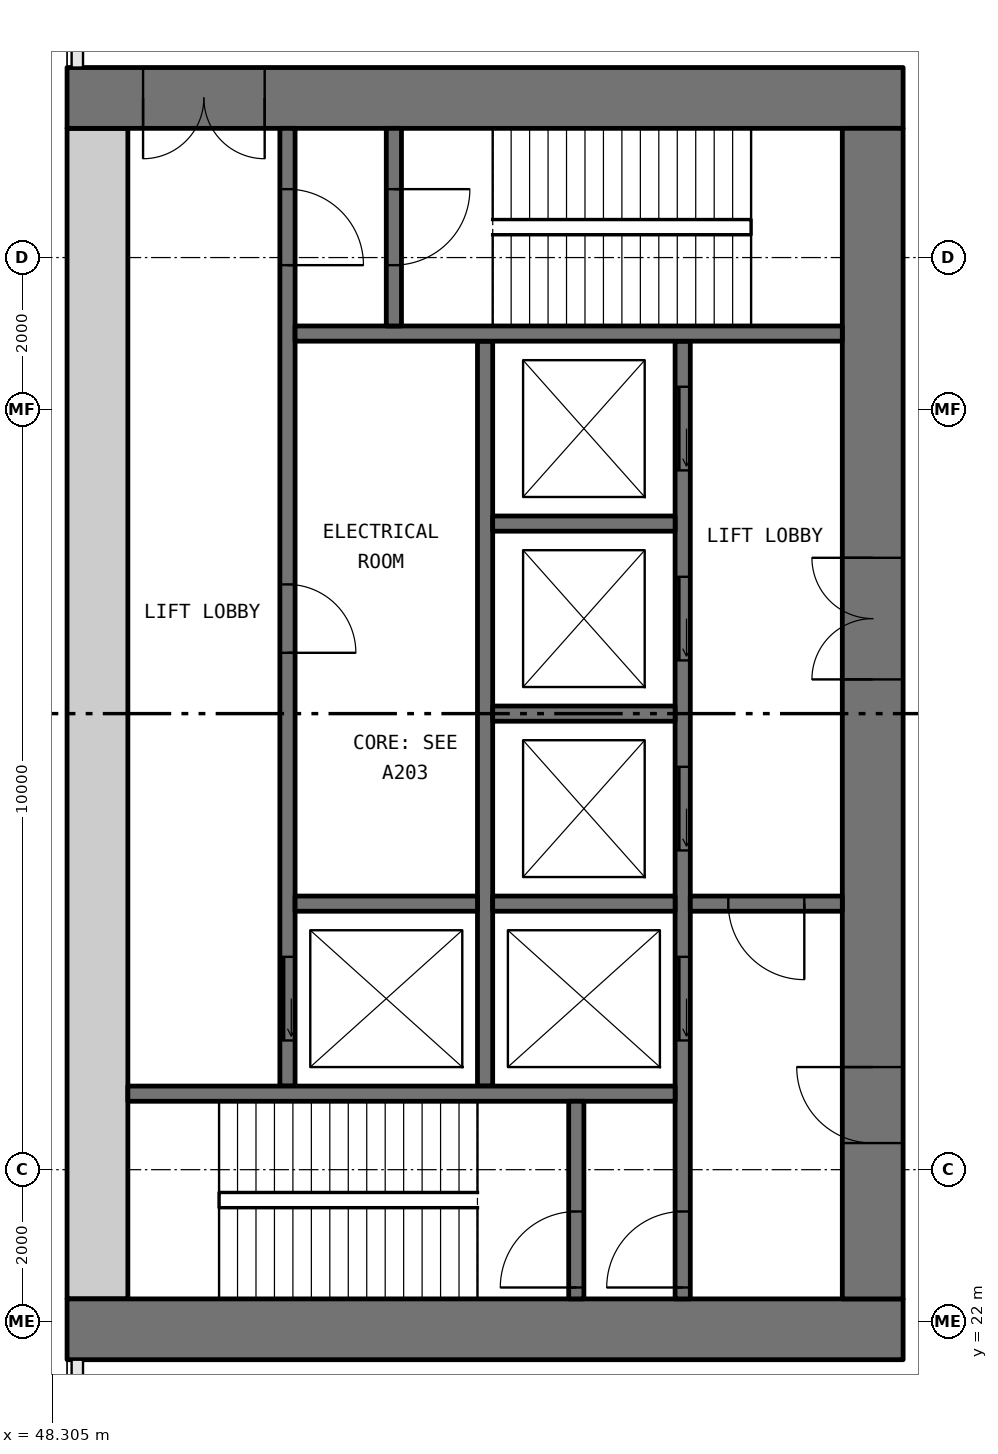
"""IFC4 building model, lengths in metres.
Left out: names, types, materials, properties, quantities, classifications, styles, units other than length and angle.
Written with IfcOpenShell. Run it as: python <this file> out.ifc"""

import sys

from ifc_helpers import new_model, si_unit, direction, frame, frame_2d, origin, place, context, subcontext, project, spatial, rectangle, extrude, element, fill, save


model = new_model("IFC4")
c1 = context("Model", 3, precision=1e-05, world=origin(), true_north=direction((0.0, 1.0)))
c2 = subcontext(c1, "Body", "Model", "MODEL_VIEW")
j1 = project(units=[si_unit("LENGTHUNIT", "METRE"), si_unit("PLANEANGLEUNIT", "RADIAN")], contexts=[c1])
p1 = place(None, origin())
s1 = spatial("IfcSite", under=j1, at=p1, CompositionType="ELEMENT")
p2 = place(p1, origin())
s2 = spatial("IfcBuilding", under=s1, at=p2, CompositionType="ELEMENT")
p3 = place(p2, frame((0.0, 0.0, 12.0)))
s3 = spatial("IfcBuildingStorey", under=s2, at=p3, CompositionType="ELEMENT", Elevation=12.0)
p4 = place(p3, frame((59.5, 21.9, 0.0), z_axis=(0.0, 0.0, 1.0), x_axis=(-1.0, 0.0, 0.0)))
e1 = element("IfcWall", 1, at=p4, inside=s3, PredefinedType="SHEAR", context=c2, shape_type="SweptSolid", body=[
    extrude(rectangle(XDim=11.0, YDim=0.8, at=frame_2d((5.5, 0.0))), origin(), (0.0, 0.0, 1.0), 5.6),
])
p5 = place(p3, frame((59.5, 38.1, 0.0), z_axis=(0.0, 0.0, 1.0), x_axis=(-1.0, 0.0, 0.0)))
e2 = element("IfcWall", 2, at=p5, inside=s3, PredefinedType="SHEAR", context=c2, shape_type="SweptSolid", body=[
    extrude(rectangle(XDim=11.0, YDim=0.8, at=frame_2d((5.5, 0.0))), origin(), (0.0, 0.0, 1.0), 5.6),
])
p6 = place(p5, frame((8.4, 0.0, 0.0)))
e3 = element("IfcOpeningElement", 3, at=p6, cuts=e2, PredefinedType="OPENING", context=c2, shape_type="SweptSolid", body=[
    extrude(rectangle(XDim=1.6, YDim=2.1, at=frame_2d((0.8, 1.05))), frame((0.0, 0.41, 0.0), z_axis=(0.0, -1.0, 0.0), x_axis=(1.0, 0.0, 0.0)), (0.0, 0.0, 1.0), 0.82),
])
p7 = place(p3, frame((59.1, 22.3, 0.0), z_axis=(0.0, 0.0, 1.0), x_axis=(0.0, 1.0, 0.0)))
e4 = element("IfcWall", 4, at=p7, inside=s3, PredefinedType="SHEAR", context=c2, shape_type="SweptSolid", body=[
    extrude(rectangle(XDim=15.4, YDim=0.8, at=frame_2d((7.7, 0.0))), origin(), (0.0, 0.0, 1.0), 5.6),
])
p8 = place(p7, frame((8.15, 0.0, 0.0)))
e5 = element("IfcOpeningElement", 5, at=p8, cuts=e4, PredefinedType="OPENING", context=c2, shape_type="SweptSolid", body=[
    extrude(rectangle(XDim=1.6, YDim=2.1, at=frame_2d((0.8, 1.05))), frame((0.0, 0.41, 0.0), z_axis=(0.0, -1.0, 0.0), x_axis=(1.0, 0.0, 0.0)), (0.0, 0.0, 1.0), 0.82),
])
p9 = place(p7, frame((2.05, 0.0, 0.0)))
e6 = element("IfcOpeningElement", 6, at=p9, cuts=e4, PredefinedType="OPENING", context=c2, shape_type="SweptSolid", body=[
    extrude(rectangle(XDim=1.0, YDim=2.1, at=frame_2d((0.5, 1.05))), frame((0.0, 0.41, 0.0), z_axis=(0.0, -1.0, 0.0), x_axis=(1.0, 0.0, 0.0)), (0.0, 0.0, 1.0), 0.82),
])
p10 = place(p3, frame((48.9, 22.3, 0.0), z_axis=(0.0, 0.0, 1.0), x_axis=(0.0, 1.0, 0.0)))
e7 = element("IfcWall", 7, at=p10, inside=s3, PredefinedType="SHEAR", context=c2, shape_type="SweptSolid", body=[
    extrude(rectangle(XDim=15.4, YDim=0.8, at=frame_2d((7.7, 0.0))), origin(), (0.0, 0.0, 1.0), 5.6),
])
p11 = place(p3, frame((56.6, 22.3, 0.0), z_axis=(0.0, 0.0, 1.0), x_axis=(0.0, 1.0, 0.0)))
e8 = element("IfcWall", 8, at=p11, inside=s3, PredefinedType="SOLIDWALL", context=c2, shape_type="SweptSolid", body=[
    extrude(rectangle(XDim=12.6, YDim=0.2, at=frame_2d((6.3, 0.0))), origin(), (0.0, 0.0, 1.0), 5.6),
])
p12 = place(p11, frame((3.4, 0.0, 0.0)))
e9 = element("IfcOpeningElement", 9, at=p12, cuts=e8, PredefinedType="OPENING", context=c2, shape_type="SweptSolid", body=[
    extrude(rectangle(XDim=1.1, YDim=2.1, at=frame_2d((0.55, 1.05))), frame((0.0, 0.11, 0.0), z_axis=(0.0, -1.0, 0.0), x_axis=(1.0, 0.0, 0.0)), (0.0, 0.0, 1.0), 0.22),
])
p13 = place(p11, frame((5.9, 0.0, 0.0)))
e10 = element("IfcOpeningElement", 10, at=p13, cuts=e8, PredefinedType="OPENING", context=c2, shape_type="SweptSolid", body=[
    extrude(rectangle(XDim=1.1, YDim=2.1, at=frame_2d((0.55, 1.05))), frame((0.0, 0.11, 0.0), z_axis=(0.0, -1.0, 0.0), x_axis=(1.0, 0.0, 0.0)), (0.0, 0.0, 1.0), 0.22),
])
p14 = place(p11, frame((8.4, 0.0, 0.0)))
e11 = element("IfcOpeningElement", 11, at=p14, cuts=e8, PredefinedType="OPENING", context=c2, shape_type="SweptSolid", body=[
    extrude(rectangle(XDim=1.1, YDim=2.1, at=frame_2d((0.55, 1.05))), frame((0.0, 0.11, 0.0), z_axis=(0.0, -1.0, 0.0), x_axis=(1.0, 0.0, 0.0)), (0.0, 0.0, 1.0), 0.22),
])
p15 = place(p11, frame((10.9, 0.0, 0.0)))
e12 = element("IfcOpeningElement", 12, at=p15, cuts=e8, PredefinedType="OPENING", context=c2, shape_type="SweptSolid", body=[
    extrude(rectangle(XDim=1.1, YDim=2.1, at=frame_2d((0.55, 1.05))), frame((0.0, 0.11, 0.0), z_axis=(0.0, -1.0, 0.0), x_axis=(1.0, 0.0, 0.0)), (0.0, 0.0, 1.0), 0.22),
])
p16 = place(p11, frame((0.15, 0.0, 0.0)))
e13 = element("IfcOpeningElement", 13, at=p16, cuts=e8, PredefinedType="OPENING", context=c2, shape_type="SweptSolid", body=[
    extrude(rectangle(XDim=1.0, YDim=2.1, at=frame_2d((0.5, 1.05))), frame((0.0, 0.11, 0.0), z_axis=(0.0, -1.0, 0.0), x_axis=(1.0, 0.0, 0.0)), (0.0, 0.0, 1.0), 0.22),
])
p17 = place(p3, frame((51.4, 25.1, 0.0), z_axis=(0.0, 0.0, 1.0), x_axis=(0.0, 1.0, 0.0)))
e14 = element("IfcWall", 14, at=p17, inside=s3, PredefinedType="SOLIDWALL", context=c2, shape_type="SweptSolid", body=[
    extrude(rectangle(XDim=12.6, YDim=0.2, at=frame_2d((6.3, 0.0))), origin(), (0.0, 0.0, 1.0), 5.6),
])
p18 = place(p17, frame((0.6, 0.0, 0.0)))
e15 = element("IfcOpeningElement", 15, at=p18, cuts=e14, PredefinedType="OPENING", context=c2, shape_type="SweptSolid", body=[
    extrude(rectangle(XDim=1.1, YDim=2.1, at=frame_2d((0.55, 1.05))), frame((0.0, 0.11, 0.0), z_axis=(0.0, -1.0, 0.0), x_axis=(1.0, 0.0, 0.0)), (0.0, 0.0, 1.0), 0.22),
])
p19 = place(p17, frame((10.8, 0.0, 0.0)))
e16 = element("IfcOpeningElement", 16, at=p19, cuts=e14, PredefinedType="OPENING", context=c2, shape_type="SweptSolid", body=[
    extrude(rectangle(XDim=1.0, YDim=2.1, at=frame_2d((0.5, 1.05))), frame((0.0, 0.11, 0.0), z_axis=(0.0, -1.0, 0.0), x_axis=(1.0, 0.0, 0.0)), (0.0, 0.0, 1.0), 0.22),
])
p20 = place(p17, frame((5.7, 0.0, 0.0)))
e17 = element("IfcOpeningElement", 17, at=p20, cuts=e14, PredefinedType="OPENING", context=c2, shape_type="SweptSolid", body=[
    extrude(rectangle(XDim=0.9, YDim=2.1, at=frame_2d((0.45, 1.05))), frame((0.0, 0.11, 0.0), z_axis=(0.0, -1.0, 0.0), x_axis=(1.0, 0.0, 0.0)), (0.0, 0.0, 1.0), 0.22),
])
p21 = place(p3, frame((54.0, 25.1, 0.0), z_axis=(0.0, 0.0, 1.0), x_axis=(0.0, 1.0, 0.0)))
e18 = element("IfcWall", 18, at=p21, inside=s3, PredefinedType="SOLIDWALL", context=c2, shape_type="SweptSolid", body=[
    extrude(rectangle(XDim=9.8, YDim=0.2, at=frame_2d((4.9, 0.0))), origin(), (0.0, 0.0, 1.0), 5.6),
])
for number, where, z_axis, x_axis in (
    (19, (56.5, 25.0, 0.0), (0.0, 0.0, 1.0), (-1.0, 0.0, 0.0)),
    (20, (58.7, 35.0, 0.0), (0.0, 0.0, 1.0), (-1.0, 0.0, 0.0)),
):
    element("IfcWall", number, at=place(p3, frame(where, z_axis=z_axis, x_axis=x_axis)), inside=s3, PredefinedType="SOLIDWALL", context=c2, shape_type="SweptSolid", body=[
        extrude(rectangle(XDim=7.2, YDim=0.2, at=frame_2d((3.6, 0.0))), origin(), (0.0, 0.0, 1.0), 5.6),
    ])
p22 = place(p3, frame((58.7, 27.5, 0.0), z_axis=(0.0, 0.0, 1.0), x_axis=(-1.0, 0.0, 0.0)))
e21 = element("IfcWall", 21, at=p22, inside=s3, PredefinedType="SOLIDWALL", context=c2, shape_type="SweptSolid", body=[
    extrude(rectangle(XDim=2.0, YDim=0.2, at=frame_2d((1.0, 0.0))), origin(), (0.0, 0.0, 1.0), 5.6),
])
p23 = place(p22, frame((0.5, 0.0, 0.0)))
e22 = element("IfcOpeningElement", 22, at=p23, cuts=e21, PredefinedType="OPENING", context=c2, shape_type="SweptSolid", body=[
    extrude(rectangle(XDim=1.0, YDim=2.1, at=frame_2d((0.5, 1.05))), frame((0.0, 0.11, 0.0), z_axis=(0.0, -1.0, 0.0), x_axis=(1.0, 0.0, 0.0)), (0.0, 0.0, 1.0), 0.22),
])
p24 = place(p3, frame((55.2, 22.3, 0.0), z_axis=(0.0, 0.0, 1.0), x_axis=(0.0, 1.0, 0.0)))
e23 = element("IfcWall", 23, at=p24, inside=s3, PredefinedType="SOLIDWALL", context=c2, shape_type="SweptSolid", body=[
    extrude(rectangle(XDim=2.6, YDim=0.2, at=frame_2d((1.3, 0.0))), origin(), (0.0, 0.0, 1.0), 5.6),
])
p25 = place(p24, frame((0.15, 0.0, 0.0)))
e24 = element("IfcOpeningElement", 24, at=p25, cuts=e23, PredefinedType="OPENING", context=c2, shape_type="SweptSolid", body=[
    extrude(rectangle(XDim=1.0, YDim=2.1, at=frame_2d((0.5, 1.05))), frame((0.0, 0.11, 0.0), z_axis=(0.0, -1.0, 0.0), x_axis=(1.0, 0.0, 0.0)), (0.0, 0.0, 1.0), 0.22),
])
p26 = place(p3, frame((52.8, 35.1, 0.0), z_axis=(0.0, 0.0, 1.0), x_axis=(0.0, 1.0, 0.0)))
e25 = element("IfcWall", 25, at=p26, inside=s3, PredefinedType="SOLIDWALL", context=c2, shape_type="SweptSolid", body=[
    extrude(rectangle(XDim=2.6, YDim=0.2, at=frame_2d((1.3, 0.0))), origin(), (0.0, 0.0, 1.0), 5.6),
])
p27 = place(p26, frame((0.8, 0.0, 0.0)))
e26 = element("IfcOpeningElement", 26, at=p27, cuts=e25, PredefinedType="OPENING", context=c2, shape_type="SweptSolid", body=[
    extrude(rectangle(XDim=1.0, YDim=2.1, at=frame_2d((0.5, 1.05))), frame((0.0, 0.11, 0.0), z_axis=(0.0, -1.0, 0.0), x_axis=(1.0, 0.0, 0.0)), (0.0, 0.0, 1.0), 0.22),
])
for number, where, z_axis, x_axis in (
    (27, (56.5, 27.5, 0.0), (0.0, 0.0, 1.0), (-1.0, 0.0, 0.0)),
    (28, (56.5, 30.0, 0.0), (0.0, 0.0, 1.0), (-1.0, 0.0, 0.0)),
    (29, (56.5, 32.5, 0.0), (0.0, 0.0, 1.0), (-1.0, 0.0, 0.0)),
    (30, (53.9, 27.5, 0.0), (0.0, 0.0, 1.0), (-1.0, 0.0, 0.0)),
):
    element("IfcWall", number, at=place(p3, frame(where, z_axis=z_axis, x_axis=x_axis)), inside=s3, PredefinedType="SOLIDWALL", context=c2, shape_type="SweptSolid", body=[
        extrude(rectangle(XDim=2.4, YDim=0.2, at=frame_2d((1.2, 0.0))), origin(), (0.0, 0.0, 1.0), 5.6),
    ])
p28 = place(p18, origin())
e31 = element("IfcDoor", 31, at=p28, inside=s3, OperationType="SLIDING_TO_LEFT", PredefinedType="DOOR", context=c2, shape_type="SweptSolid", body=[
    extrude(rectangle(XDim=1.1, YDim=2.1, at=frame_2d((0.55, 1.05))), frame((0.0, 0.025, 0.0), z_axis=(0.0, -1.0, 0.0), x_axis=(1.0, 0.0, 0.0)), (0.0, 0.0, 1.0), 0.05),
])
fill(e15, e31)
p29 = place(p12, origin())
e32 = element("IfcDoor", 32, at=p29, inside=s3, OperationType="SLIDING_TO_LEFT", PredefinedType="DOOR", context=c2, shape_type="SweptSolid", body=[
    extrude(rectangle(XDim=1.1, YDim=2.1, at=frame_2d((0.55, 1.05))), frame((0.0, 0.025, 0.0), z_axis=(0.0, -1.0, 0.0), x_axis=(1.0, 0.0, 0.0)), (0.0, 0.0, 1.0), 0.05),
])
fill(e9, e32)
p30 = place(p13, origin())
e33 = element("IfcDoor", 33, at=p30, inside=s3, OperationType="SLIDING_TO_LEFT", PredefinedType="DOOR", context=c2, shape_type="SweptSolid", body=[
    extrude(rectangle(XDim=1.1, YDim=2.1, at=frame_2d((0.55, 1.05))), frame((0.0, 0.025, 0.0), z_axis=(0.0, -1.0, 0.0), x_axis=(1.0, 0.0, 0.0)), (0.0, 0.0, 1.0), 0.05),
])
fill(e10, e33)
p31 = place(p14, origin())
e34 = element("IfcDoor", 34, at=p31, inside=s3, OperationType="SLIDING_TO_LEFT", PredefinedType="DOOR", context=c2, shape_type="SweptSolid", body=[
    extrude(rectangle(XDim=1.1, YDim=2.1, at=frame_2d((0.55, 1.05))), frame((0.0, 0.025, 0.0), z_axis=(0.0, -1.0, 0.0), x_axis=(1.0, 0.0, 0.0)), (0.0, 0.0, 1.0), 0.05),
])
fill(e11, e34)
p32 = place(p15, origin())
e35 = element("IfcDoor", 35, at=p32, inside=s3, OperationType="SLIDING_TO_LEFT", PredefinedType="DOOR", context=c2, shape_type="SweptSolid", body=[
    extrude(rectangle(XDim=1.1, YDim=2.1, at=frame_2d((0.55, 1.05))), frame((0.0, 0.025, 0.0), z_axis=(0.0, -1.0, 0.0), x_axis=(1.0, 0.0, 0.0)), (0.0, 0.0, 1.0), 0.05),
])
fill(e12, e35)
p33 = place(p25, origin())
e36 = element("IfcDoor", 36, at=p33, inside=s3, OperationType="SINGLE_SWING_RIGHT", PredefinedType="DOOR", context=c2, shape_type="SweptSolid", body=[
    extrude(rectangle(XDim=1.0, YDim=2.1, at=frame_2d((0.5, 1.05))), frame((0.0, 0.025, 0.0), z_axis=(0.0, -1.0, 0.0), x_axis=(1.0, 0.0, 0.0)), (0.0, 0.0, 1.0), 0.05),
])
fill(e24, e36)
p34 = place(p16, origin())
e37 = element("IfcDoor", 37, at=p34, inside=s3, OperationType="SINGLE_SWING_RIGHT", PredefinedType="DOOR", context=c2, shape_type="SweptSolid", body=[
    extrude(rectangle(XDim=1.0, YDim=2.1, at=frame_2d((0.5, 1.05))), frame((0.0, 0.025, 0.0), z_axis=(0.0, -1.0, 0.0), x_axis=(1.0, 0.0, 0.0)), (0.0, 0.0, 1.0), 0.05),
])
fill(e13, e37)
p35 = place(p19, frame((1.0, 0.0, 0.0), x_axis=(-1.0, 0.0, 0.0)))
e38 = element("IfcDoor", 38, at=p35, inside=s3, OperationType="SINGLE_SWING_LEFT", PredefinedType="DOOR", context=c2, shape_type="SweptSolid", body=[
    extrude(rectangle(XDim=1.0, YDim=2.1, at=frame_2d((0.5, 1.05))), frame((0.0, 0.025, 0.0), z_axis=(0.0, -1.0, 0.0), x_axis=(1.0, 0.0, 0.0)), (0.0, 0.0, 1.0), 0.05),
])
fill(e16, e38)
p36 = place(p27, frame((1.0, 0.0, 0.0), x_axis=(-1.0, 0.0, 0.0)))
e39 = element("IfcDoor", 39, at=p36, inside=s3, OperationType="SINGLE_SWING_RIGHT", PredefinedType="DOOR", context=c2, shape_type="SweptSolid", body=[
    extrude(rectangle(XDim=1.0, YDim=2.1, at=frame_2d((0.5, 1.05))), frame((0.0, 0.025, 0.0), z_axis=(0.0, -1.0, 0.0), x_axis=(1.0, 0.0, 0.0)), (0.0, 0.0, 1.0), 0.05),
])
fill(e26, e39)
p37 = place(p23, origin())
e40 = element("IfcDoor", 40, at=p37, inside=s3, OperationType="SINGLE_SWING_RIGHT", PredefinedType="DOOR", context=c2, shape_type="SweptSolid", body=[
    extrude(rectangle(XDim=1.0, YDim=2.1, at=frame_2d((0.5, 1.05))), frame((0.0, 0.025, 0.0), z_axis=(0.0, -1.0, 0.0), x_axis=(1.0, 0.0, 0.0)), (0.0, 0.0, 1.0), 0.05),
])
fill(e22, e40)
p38 = place(p8, origin())
e41 = element("IfcDoor", 41, at=p38, inside=s3, OperationType="DOUBLE_DOOR_SINGLE_SWING", PredefinedType="DOOR", context=c2, shape_type="SweptSolid", body=[
    extrude(rectangle(XDim=1.6, YDim=2.1, at=frame_2d((0.8, 1.05))), frame((0.0, 0.025, 0.0), z_axis=(0.0, -1.0, 0.0), x_axis=(1.0, 0.0, 0.0)), (0.0, 0.0, 1.0), 0.05),
])
fill(e5, e41)
p39 = place(p9, origin())
e42 = element("IfcDoor", 42, at=p39, inside=s3, OperationType="SINGLE_SWING_LEFT", PredefinedType="DOOR", context=c2, shape_type="SweptSolid", body=[
    extrude(rectangle(XDim=1.0, YDim=2.1, at=frame_2d((0.5, 1.05))), frame((0.0, 0.025, 0.0), z_axis=(0.0, -1.0, 0.0), x_axis=(1.0, 0.0, 0.0)), (0.0, 0.0, 1.0), 0.05),
])
fill(e6, e42)
p40 = place(p6, origin())
e43 = element("IfcDoor", 43, at=p40, inside=s3, OperationType="DOUBLE_DOOR_SINGLE_SWING", PredefinedType="DOOR", context=c2, shape_type="SweptSolid", body=[
    extrude(rectangle(XDim=1.6, YDim=2.1, at=frame_2d((0.8, 1.05))), frame((0.0, 0.025, 0.0), z_axis=(0.0, -1.0, 0.0), x_axis=(1.0, 0.0, 0.0)), (0.0, 0.0, 1.0), 0.05),
])
fill(e3, e43)
p41 = place(p20, frame((0.9, 0.0, 0.0), x_axis=(-1.0, 0.0, 0.0)))
e44 = element("IfcDoor", 44, at=p41, inside=s3, OperationType="SINGLE_SWING_LEFT", PredefinedType="DOOR", context=c2, shape_type="SweptSolid", body=[
    extrude(rectangle(XDim=0.9, YDim=2.1, at=frame_2d((0.45, 1.05))), frame((0.0, 0.025, 0.0), z_axis=(0.0, -1.0, 0.0), x_axis=(1.0, 0.0, 0.0)), (0.0, 0.0, 1.0), 0.05),
])
fill(e17, e44)
save(model, sys.argv[1])
